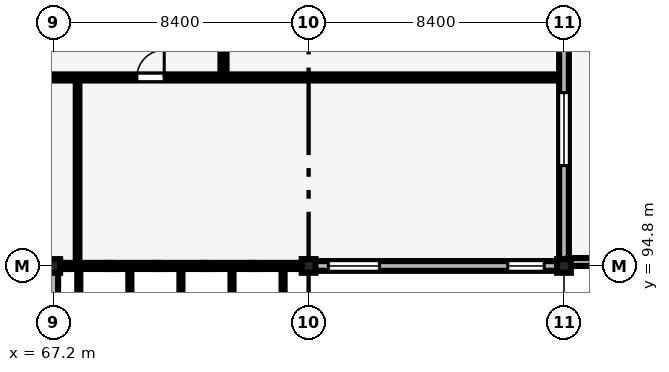
"""IFC4 building model, lengths in metres.
Left out: names, types, materials, properties, quantities, classifications, styles, units other than length and angle.
Written with IfcOpenShell. Run it as: python <this file> out.ifc"""

import sys

from ifc_helpers import new_model, si_unit, direction, frame, frame_2d, origin, origin_2d, place, context, subcontext, project, spatial, rectangle, extrude, element, fill, save


model = new_model("IFC4")
c1 = context("Model", 3, precision=1e-05, world=origin(), true_north=direction((0.0, 1.0)))
c2 = subcontext(c1, "Body", "Model", "MODEL_VIEW")
j1 = project(units=[si_unit("LENGTHUNIT", "METRE"), si_unit("PLANEANGLEUNIT", "RADIAN")], contexts=[c1])
p1 = place(None, origin())
s1 = spatial("IfcSite", under=j1, at=p1, CompositionType="ELEMENT")
p2 = place(p1, origin())
s2 = spatial("IfcBuilding", under=s1, at=p2, CompositionType="ELEMENT")
p3 = place(p2, frame((0.0, 0.0, 17.4)))
s3 = spatial("IfcBuildingStorey", under=s2, at=p3, CompositionType="ELEMENT", Elevation=17.4)
for number, where, z_axis, x_axis in (
    (1, (67.2, 94.8, 0.0), (0.0, 0.0, 1.0), (1.0, 0.0, 0.0)),
    (2, (75.6, 94.8, 0.0), (0.0, 0.0, 1.0), (1.0, 0.0, 0.0)),
    (3, (84.0, 94.8, 0.0), (0.0, 0.0, 1.0), (1.0, 0.0, 0.0)),
):
    element("IfcColumn", number, at=place(p3, frame(where, z_axis=z_axis, x_axis=x_axis)), inside=s3, PredefinedType="COLUMN", context=c2, shape_type="SweptSolid", body=[
        extrude(rectangle(XDim=0.45, YDim=0.45, at=origin_2d()), origin(), (0.0, 0.0, 1.0), 4.2),
    ])
p4 = place(p3, frame((67.2, 86.0, 0.0), z_axis=(0.0, 0.0, 1.0), x_axis=(0.0, 1.0, 0.0)))
e4 = element("IfcWall", 4, at=p4, inside=s3, PredefinedType="SOLIDWALL", context=c2, shape_type="SweptSolid", body=[
    extrude(rectangle(XDim=8.6, YDim=0.32, at=frame_2d((4.3, 0.0))), origin(), (0.0, 0.0, 1.0), 3.43),
])
p5 = place(p4, frame((3.1, 0.0, 0.9)))
e5 = element("IfcOpeningElement", 5, at=p5, cuts=e4, PredefinedType="OPENING", context=c2, shape_type="SweptSolid", body=[
    extrude(rectangle(XDim=2.4, YDim=1.8, at=frame_2d((1.2, 0.9))), frame((0.0, 0.17, 0.0), z_axis=(0.0, -1.0, 0.0), x_axis=(1.0, 0.0, 0.0)), (0.0, 0.0, 1.0), 0.34),
])
p6 = place(p3, frame((75.8, 94.8, 0.0), z_axis=(0.0, 0.0, 1.0), x_axis=(1.0, 0.0, 0.0)))
e6 = element("IfcWall", 6, at=p6, inside=s3, PredefinedType="SOLIDWALL", context=c2, shape_type="SweptSolid", body=[
    extrude(rectangle(XDim=8.0, YDim=0.32, at=frame_2d((4.0, 0.0))), origin(), (0.0, 0.0, 1.0), 3.48),
])
p7 = place(p6, frame((0.45, 0.0, 0.9)))
e7 = element("IfcOpeningElement", 7, at=p7, cuts=e6, PredefinedType="OPENING", context=c2, shape_type="SweptSolid", body=[
    extrude(rectangle(XDim=1.68, YDim=2.4, at=frame_2d((0.84, 1.2))), frame((0.0, 0.17, 0.0), z_axis=(0.0, -1.0, 0.0), x_axis=(1.0, 0.0, 0.0)), (0.0, 0.0, 1.0), 0.34),
])
p8 = place(p6, frame((6.35, 0.0, 0.9)))
e8 = element("IfcOpeningElement", 8, at=p8, cuts=e6, PredefinedType="OPENING", context=c2, shape_type="SweptSolid", body=[
    extrude(rectangle(XDim=1.2, YDim=1.5, at=frame_2d((0.6, 0.75))), frame((0.0, 0.17, 0.0), z_axis=(0.0, -1.0, 0.0), x_axis=(1.0, 0.0, 0.0)), (0.0, 0.0, 1.0), 0.34),
])
p9 = place(p3, frame((84.0, 95.0, 0.0), z_axis=(0.0, 0.0, 1.0), x_axis=(0.0, 1.0, 0.0)))
e9 = element("IfcWall", 9, at=p9, inside=s3, PredefinedType="SOLIDWALL", context=c2, shape_type="SweptSolid", body=[
    extrude(rectangle(XDim=8.6, YDim=0.32, at=frame_2d((4.3, 0.0))), origin(), (0.0, 0.0, 1.0), 3.48),
])
p10 = place(p9, frame((3.1, 0.0, 0.9)))
e10 = element("IfcOpeningElement", 10, at=p10, cuts=e9, PredefinedType="OPENING", context=c2, shape_type="SweptSolid", body=[
    extrude(rectangle(XDim=2.4, YDim=1.8, at=frame_2d((1.2, 0.9))), frame((0.0, 0.17, 0.0), z_axis=(0.0, -1.0, 0.0), x_axis=(1.0, 0.0, 0.0)), (0.0, 0.0, 1.0), 0.34),
])
p11 = place(p3, frame((84.13, 94.93, 0.0), z_axis=(0.0, 0.0, 1.0), x_axis=(1.0, 0.0, 0.0)))
e11 = element("IfcWall", 11, at=p11, inside=s3, PredefinedType="PARAPET", context=c2, shape_type="SweptSolid", body=[
    extrude(rectangle(XDim=33.34, YDim=0.26, at=frame_2d((16.67, 0.0))), origin(), (0.0, 0.0, 1.0), 0.85),
])
p12 = place(p3, frame((72.8, 101.01, 0.0), z_axis=(0.0, 0.0, 1.0), x_axis=(0.0, 1.0, 0.0)))
e12 = element("IfcWall", 12, at=p12, inside=s3, PredefinedType="PARTITIONING", context=c2, shape_type="SweptSolid", body=[
    extrude(rectangle(XDim=2.78, YDim=0.2, at=frame_2d((1.39, 0.0))), origin(), (0.0, 0.0, 1.0), 3.9),
])
p13 = place(p12, frame((0.94, 0.0, 0.0)))
e13 = element("IfcOpeningElement", 13, at=p13, cuts=e12, PredefinedType="OPENING", context=c2, shape_type="SweptSolid", body=[
    extrude(rectangle(XDim=0.9, YDim=2.1, at=frame_2d((0.45, 1.05))), frame((0.0, 0.11, 0.0), z_axis=(0.0, -1.0, 0.0), x_axis=(1.0, 0.0, 0.0)), (0.0, 0.0, 1.0), 0.22),
])
p14 = place(p3, frame((68.0, 94.905, 0.0), z_axis=(0.0, 0.0, 1.0), x_axis=(0.0, 1.0, 0.0)))
e14 = element("IfcWall", 14, at=p14, inside=s3, PredefinedType="PARTITIONING", context=c2, shape_type="SweptSolid", body=[
    extrude(rectangle(XDim=5.99, YDim=0.12, at=frame_2d((2.995, 0.0))), origin(), (0.0, 0.0, 1.0), 3.9),
])
p15 = place(p3, frame((62.31, 101.0, 0.0), z_axis=(0.0, 0.0, 1.0), x_axis=(1.0, 0.0, 0.0)))
e15 = element("IfcWall", 15, at=p15, inside=s3, PredefinedType="PARTITIONING", context=c2, shape_type="SweptSolid", body=[
    extrude(rectangle(XDim=21.525, YDim=0.2, at=frame_2d((10.762, 0.0))), origin(), (0.0, 0.0, 1.0), 3.451),
])
p16 = place(p15, frame((2.39, 0.0, 0.0)))
e16 = element("IfcOpeningElement", 16, at=p16, cuts=e15, PredefinedType="OPENING", context=c2, shape_type="SweptSolid", body=[
    extrude(rectangle(XDim=0.9, YDim=2.1, at=frame_2d((0.45, 1.05))), frame((0.0, 0.11, 0.0), z_axis=(0.0, -1.0, 0.0), x_axis=(1.0, 0.0, 0.0)), (0.0, 0.0, 1.0), 0.22),
])
p17 = place(p15, frame((7.64, 0.0, 0.0)))
e17 = element("IfcOpeningElement", 17, at=p17, cuts=e15, PredefinedType="OPENING", context=c2, shape_type="SweptSolid", body=[
    extrude(rectangle(XDim=0.9, YDim=2.1, at=frame_2d((0.45, 1.05))), frame((0.0, 0.11, 0.0), z_axis=(0.0, -1.0, 0.0), x_axis=(1.0, 0.0, 0.0)), (0.0, 0.0, 1.0), 0.22),
])
p18 = place(p7, origin())
e18 = element("IfcWindow", 18, at=p18, inside=s3, PartitioningType="SINGLE_PANEL", PredefinedType="WINDOW", context=c2, shape_type="SweptSolid", body=[
    extrude(rectangle(XDim=1.68, YDim=2.4, at=frame_2d((0.84, 1.2))), frame((0.0, 0.03, 0.0), z_axis=(0.0, -1.0, 0.0), x_axis=(1.0, 0.0, 0.0)), (0.0, 0.0, 1.0), 0.06),
])
fill(e7, e18)
p19 = place(p8, origin())
e19 = element("IfcWindow", 19, at=p19, inside=s3, PartitioningType="SINGLE_PANEL", PredefinedType="WINDOW", context=c2, shape_type="SweptSolid", body=[
    extrude(rectangle(XDim=1.2, YDim=1.5, at=frame_2d((0.6, 0.75))), frame((0.0, 0.03, 0.0), z_axis=(0.0, -1.0, 0.0), x_axis=(1.0, 0.0, 0.0)), (0.0, 0.0, 1.0), 0.06),
])
fill(e8, e19)
p20 = place(p10, origin())
e20 = element("IfcWindow", 20, at=p20, inside=s3, PartitioningType="SINGLE_PANEL", PredefinedType="WINDOW", context=c2, shape_type="SweptSolid", body=[
    extrude(rectangle(XDim=2.4, YDim=1.8, at=frame_2d((1.2, 0.9))), frame((0.0, 0.03, 0.0), z_axis=(0.0, -1.0, 0.0), x_axis=(1.0, 0.0, 0.0)), (0.0, 0.0, 1.0), 0.06),
])
fill(e10, e20)
p21 = place(p17, origin())
e21 = element("IfcDoor", 21, at=p21, inside=s3, OperationType="SINGLE_SWING_RIGHT", PredefinedType="DOOR", context=c2, shape_type="SweptSolid", body=[
    extrude(rectangle(XDim=0.9, YDim=2.1, at=frame_2d((0.45, 1.05))), frame((0.0, 0.025, 0.0), z_axis=(0.0, -1.0, 0.0), x_axis=(1.0, 0.0, 0.0)), (0.0, 0.0, 1.0), 0.05),
])
fill(e17, e21)
save(model, sys.argv[1])
